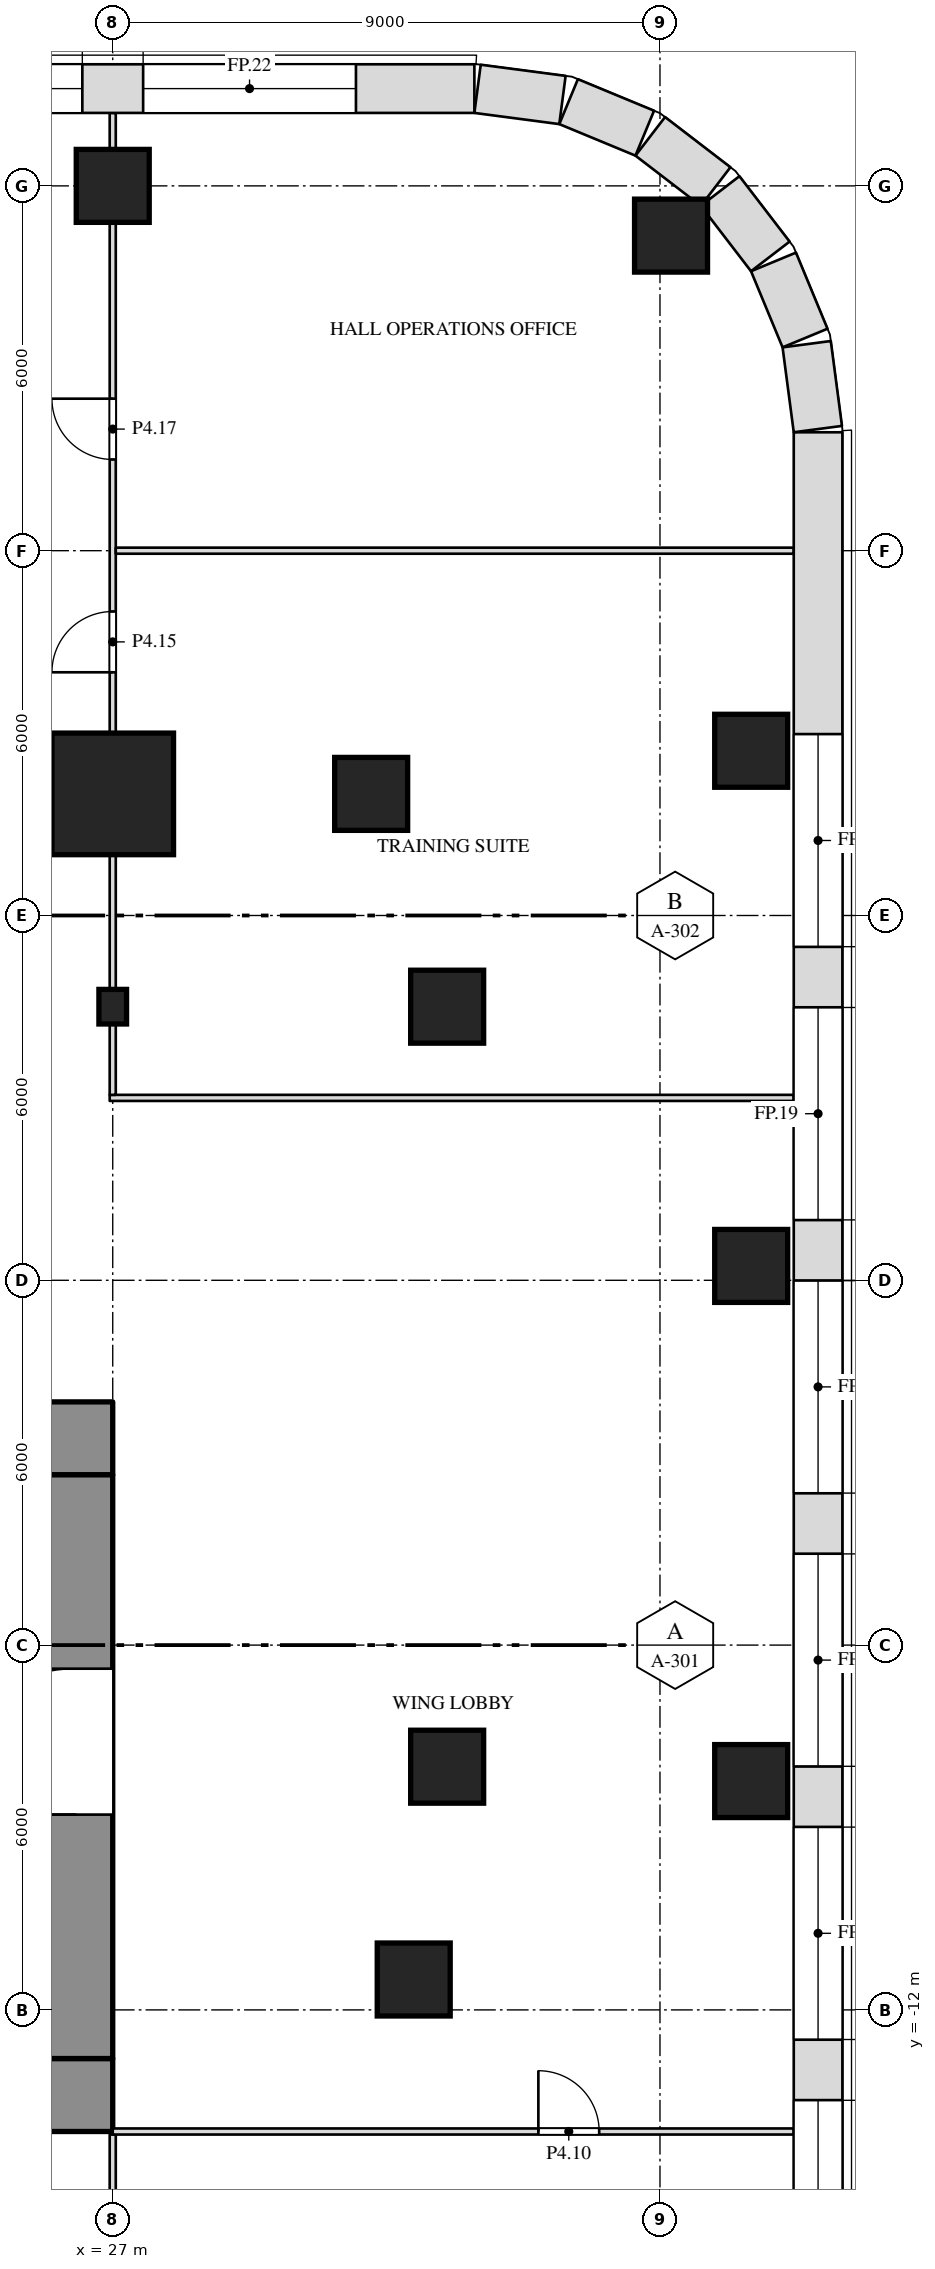
"""IFC4 building model, lengths in metres.
Left out: names, types, materials, properties, quantities, classifications, styles, units other than length and angle.
Written with IfcOpenShell. Run it as: python <this file> out.ifc"""

import sys

from ifc_helpers import new_model, si_unit, direction, frame, frame_2d, origin, origin_2d, place, context, subcontext, project, spatial, rectangle, i_section, extrude, element, fill, save


model = new_model("IFC4")
c1 = context("Model", 3, precision=1e-05, world=origin(), true_north=direction((0.0, 1.0)))
c2 = subcontext(c1, "Body", "Model", "MODEL_VIEW")
j1 = project(units=[si_unit("LENGTHUNIT", "METRE"), si_unit("PLANEANGLEUNIT", "RADIAN")], contexts=[c1])
p1 = place(None, origin())
s1 = spatial("IfcSite", under=j1, at=p1, CompositionType="ELEMENT")
p2 = place(p1, origin())
s2 = spatial("IfcBuilding", under=s1, at=p2, CompositionType="ELEMENT")
p3 = place(p2, frame((0.0, 0.0, 27.0)))
s3 = spatial("IfcBuildingStorey", under=s2, at=p3, CompositionType="ELEMENT", Elevation=27.0)
for number, where, z_axis, x_axis in (
    (1, (31.95, -11.5, 0.0), (0.0, 0.0, 1.0), (1.0, 0.0, 0.0)),
    (2, (37.5, -8.236, 0.0), (0.0, 0.0, 1.0), (1.0, 0.0, 0.0)),
    (3, (32.5, -8.0, 0.0), (0.0, 0.0, 1.0), (1.0, 0.0, 0.0)),
    (4, (37.5, 0.236, 0.0), (0.0, 0.0, 1.0), (1.0, 0.0, 0.0)),
):
    element("IfcColumn", number, at=place(p3, frame(where, z_axis=z_axis, x_axis=x_axis)), inside=s3, PredefinedType="COLUMN", context=c2, shape_type="SweptSolid", body=[
        extrude(rectangle(XDim=1.2, YDim=1.2, at=origin_2d()), origin(), (0.0, 0.0, 1.0), 6.0),
    ])
p4 = place(p3, frame((27.0, 4.5, 0.0), z_axis=(0.0, 0.0, 1.0), x_axis=(1.0, 0.0, 0.0)))
e5 = element("IfcColumn", 5, at=p4, inside=s3, PredefinedType="COLUMN", context=c2, shape_type="SweptSolid", body=[
    extrude(i_section(OverallWidth=0.455, OverallDepth=0.569, WebThickness=0.078, FlangeThickness=0.125, at=origin_2d()), origin(), (0.0, 0.0, 1.0), 6.0),
])
p5 = place(p3, frame((32.5, 4.5, 0.0), z_axis=(0.0, 0.0, 1.0), x_axis=(1.0, 0.0, 0.0)))
e6 = element("IfcColumn", 6, at=p5, inside=s3, PredefinedType="COLUMN", context=c2, shape_type="SweptSolid", body=[
    extrude(rectangle(XDim=1.2, YDim=1.2, at=origin_2d()), origin(), (0.0, 0.0, 1.0), 6.0),
])
p6 = place(p3, frame((27.0, 8.0, 0.0), z_axis=(0.0, 0.0, 1.0), x_axis=(1.0, 0.0, 0.0)))
e7 = element("IfcColumn", 7, at=p6, inside=s3, PredefinedType="COLUMN", context=c2, shape_type="SweptSolid", body=[
    extrude(rectangle(XDim=2.0, YDim=2.0, at=origin_2d()), origin(), (0.0, 0.0, 1.0), 6.0),
])
for number, where, z_axis, x_axis in (
    (8, (31.25, 8.0, 0.0), (0.0, 0.0, 1.0), (1.0, 0.0, 0.0)),
    (9, (37.5, 8.709, 0.0), (0.0, 0.0, 1.0), (1.0, 0.0, 0.0)),
    (10, (36.182, 17.182, 0.0), (0.0, 0.0, 1.0), (1.0, 0.0, 0.0)),
    (11, (27.0, 18.0, 0.0), (0.0, 0.0, 1.0), (1.0, 0.0, 0.0)),
):
    element("IfcColumn", number, at=place(p3, frame(where, z_axis=z_axis, x_axis=x_axis)), inside=s3, PredefinedType="COLUMN", context=c2, shape_type="SweptSolid", body=[
        extrude(rectangle(XDim=1.2, YDim=1.2, at=origin_2d()), origin(), (0.0, 0.0, 1.0), 6.0),
    ])
p7 = place(p3, frame((-27.0, -2.6, 0.0), z_axis=(0.0, 0.0, 1.0), x_axis=(1.0, 0.0, 0.0)))
e12 = element("IfcWall", 12, at=p7, inside=s3, PredefinedType="SHEAR", context=c2, shape_type="SweptSolid", body=[
    extrude(rectangle(XDim=54.0, YDim=1.2, at=frame_2d((27.0, 0.0))), origin(), (0.0, 0.0, 1.0), 5.7),
])
p8 = place(p3, frame((-27.0, -13.4, 0.0), z_axis=(0.0, 0.0, 1.0), x_axis=(1.0, 0.0, 0.0)))
e13 = element("IfcWall", 13, at=p8, inside=s3, PredefinedType="SHEAR", context=c2, shape_type="SweptSolid", body=[
    extrude(rectangle(XDim=54.0, YDim=1.2, at=frame_2d((27.0, 0.0))), origin(), (0.0, 0.0, 1.0), 5.7),
])
p9 = place(p8, frame((16.45, 0.0, 0.0)))
e14 = element("IfcOpeningElement", 14, at=p9, cuts=e13, PredefinedType="OPENING", context=c2, shape_type="SweptSolid", body=[
    extrude(rectangle(XDim=1.0, YDim=2.1, at=frame_2d((0.5, 1.05))), frame((0.0, 0.612, 0.0), z_axis=(0.0, -1.0, 0.0), x_axis=(1.0, 0.0, 0.0)), (0.0, 0.0, 1.0), 1.224),
])
p10 = place(p8, frame((36.55, 0.0, 0.0)))
e15 = element("IfcOpeningElement", 15, at=p10, cuts=e13, PredefinedType="OPENING", context=c2, shape_type="SweptSolid", body=[
    extrude(rectangle(XDim=1.0, YDim=2.1, at=frame_2d((0.5, 1.05))), frame((0.0, 0.612, 0.0), z_axis=(0.0, -1.0, 0.0), x_axis=(1.0, 0.0, 0.0)), (0.0, 0.0, 1.0), 1.224),
])
p11 = place(p3, frame((26.4, -12.8, 0.0), z_axis=(0.0, 0.0, 1.0), x_axis=(0.0, 1.0, 0.0)))
e16 = element("IfcWall", 16, at=p11, inside=s3, PredefinedType="SHEAR", context=c2, shape_type="SweptSolid", body=[
    extrude(rectangle(XDim=9.6, YDim=1.2, at=frame_2d((4.8, 0.0))), origin(), (0.0, 0.0, 1.0), 5.7),
])
p12 = place(p11, frame((4.012, 0.0, 0.0)))
e17 = element("IfcOpeningElement", 17, at=p12, cuts=e16, PredefinedType="OPENING", context=c2, shape_type="SweptSolid", body=[
    extrude(rectangle(XDim=2.4, YDim=2.1, at=frame_2d((1.2, 1.05))), frame((0.0, 0.612, 0.0), z_axis=(0.0, -1.0, 0.0), x_axis=(1.0, 0.0, 0.0)), (0.0, 0.0, 1.0), 1.224),
])
p13 = place(p3, frame((27.0, -16.9, 0.0), z_axis=(0.0, 0.0, 1.0), x_axis=(0.0, 1.0, 0.0)))
e18 = element("IfcWall", 18, at=p13, inside=s3, PredefinedType="PARTITIONING", context=c2, shape_type="SweptSolid", body=[
    extrude(rectangle(XDim=2.85, YDim=0.1, at=frame_2d((1.425, 0.0))), origin(), (0.0, 0.0, 1.0), 5.088),
])
p14 = place(p3, frame((27.0, -14.0, 0.0), z_axis=(0.0, 0.0, 1.0), x_axis=(1.0, 0.0, 0.0)))
e19 = element("IfcWall", 19, at=p14, inside=s3, PredefinedType="PARTITIONING", context=c2, shape_type="SweptSolid", body=[
    extrude(rectangle(XDim=11.2, YDim=0.1, at=frame_2d((5.6, 0.0))), origin(), (0.0, 0.0, 1.0), 5.7),
])
p15 = place(p14, frame((7.0, 0.0, 0.0)))
e20 = element("IfcOpeningElement", 20, at=p15, cuts=e19, PredefinedType="OPENING", context=c2, shape_type="SweptSolid", body=[
    extrude(rectangle(XDim=1.0, YDim=2.1, at=frame_2d((0.5, 1.05))), frame((0.0, 0.062, 0.0), z_axis=(0.0, -1.0, 0.0), x_axis=(1.0, 0.0, 0.0)), (0.0, 0.0, 1.0), 0.124),
])
p16 = place(p3, frame((26.95, 3.0, 0.0), z_axis=(0.0, 0.0, 1.0), x_axis=(1.0, 0.0, 0.0)))
e21 = element("IfcWall", 21, at=p16, inside=s3, PredefinedType="PARTITIONING", context=c2, shape_type="SweptSolid", body=[
    extrude(rectangle(XDim=11.25, YDim=0.1, at=frame_2d((5.625, 0.0))), origin(), (0.0, 0.0, 1.0), 5.7),
])
p17 = place(p3, frame((27.0, 3.05, 0.0), z_axis=(0.0, 0.0, 1.0), x_axis=(0.0, 1.0, 0.0)))
e22 = element("IfcWall", 22, at=p17, inside=s3, PredefinedType="PARTITIONING", context=c2, shape_type="SweptSolid", body=[
    extrude(rectangle(XDim=1.166, YDim=0.1, at=frame_2d((0.583, 0.0))), origin(), (0.0, 0.0, 1.0), 5.088),
])
p18 = place(p3, frame((27.0, 4.784, 0.0), z_axis=(0.0, 0.0, 1.0), x_axis=(0.0, 1.0, 0.0)))
e23 = element("IfcWall", 23, at=p18, inside=s3, PredefinedType="PARTITIONING", context=c2, shape_type="SweptSolid", body=[
    extrude(rectangle(XDim=2.216, YDim=0.1, at=frame_2d((1.108, 0.0))), origin(), (0.0, 0.0, 1.0), 5.088),
])
p19 = place(p3, frame((27.0, 9.0, 0.0), z_axis=(0.0, 0.0, 1.0), x_axis=(0.0, 1.0, 0.0)))
e24 = element("IfcWall", 24, at=p19, inside=s3, PredefinedType="PARTITIONING", context=c2, shape_type="SweptSolid", body=[
    extrude(rectangle(XDim=8.4, YDim=0.1, at=frame_2d((4.2, 0.0))), origin(), (0.0, 0.0, 1.0), 5.088),
])
p20 = place(p19, frame((1.0, 0.0, 0.0)))
e25 = element("IfcOpeningElement", 25, at=p20, cuts=e24, PredefinedType="OPENING", context=c2, shape_type="SweptSolid", body=[
    extrude(rectangle(XDim=1.0, YDim=2.1, at=frame_2d((0.5, 1.05))), frame((0.0, 0.062, 0.0), z_axis=(0.0, -1.0, 0.0), x_axis=(1.0, 0.0, 0.0)), (0.0, 0.0, 1.0), 0.124),
])
p21 = place(p19, frame((4.5, 0.0, 0.0)))
e26 = element("IfcOpeningElement", 26, at=p21, cuts=e24, PredefinedType="OPENING", context=c2, shape_type="SweptSolid", body=[
    extrude(rectangle(XDim=1.0, YDim=2.1, at=frame_2d((0.5, 1.05))), frame((0.0, 0.062, 0.0), z_axis=(0.0, -1.0, 0.0), x_axis=(1.0, 0.0, 0.0)), (0.0, 0.0, 1.0), 0.124),
])
p22 = place(p3, frame((27.0, 18.6, 0.0), z_axis=(0.0, 0.0, 1.0), x_axis=(0.0, 1.0, 0.0)))
e27 = element("IfcWall", 27, at=p22, inside=s3, PredefinedType="PARTITIONING", context=c2, shape_type="SweptSolid", body=[
    extrude(rectangle(XDim=0.6, YDim=0.1, at=frame_2d((0.3, 0.0))), origin(), (0.0, 0.0, 1.0), 5.7),
])
p23 = place(p3, frame((27.05, 12.0, 0.0), z_axis=(0.0, 0.0, 1.0), x_axis=(1.0, 0.0, 0.0)))
e28 = element("IfcWall", 28, at=p23, inside=s3, PredefinedType="PARTITIONING", context=c2, shape_type="SweptSolid", body=[
    extrude(rectangle(XDim=11.15, YDim=0.1, at=frame_2d((5.575, 0.0))), origin(), (0.0, 0.0, 1.0), 5.7),
])
p24 = place(p3, frame((38.6, -21.948, 0.0), z_axis=(0.0, 0.0, 1.0), x_axis=(0.0, 1.0, 0.0)))
e29 = element("IfcWall", 29, at=p24, inside=s3, PredefinedType="SOLIDWALL", context=c2, shape_type="SweptSolid", body=[
    extrude(rectangle(XDim=35.895, YDim=0.8, at=frame_2d((17.948, 0.0))), origin(), (0.0, 0.0, 1.0), 5.7),
])
p25 = place(p24, frame((4.964, 0.0, 1.0)))
e30 = element("IfcOpeningElement", 30, at=p25, cuts=e29, PredefinedType="OPENING", context=c2, shape_type="SweptSolid", body=[
    extrude(rectangle(XDim=3.5, YDim=4.0, at=frame_2d((1.75, 2.0))), frame((0.0, 0.412, 0.0), z_axis=(0.0, -1.0, 0.0), x_axis=(1.0, 0.0, 0.0)), (0.0, 0.0, 1.0), 0.824),
])
p26 = place(p24, frame((9.458, 0.0, 1.0)))
e31 = element("IfcOpeningElement", 31, at=p26, cuts=e29, PredefinedType="OPENING", context=c2, shape_type="SweptSolid", body=[
    extrude(rectangle(XDim=3.5, YDim=4.0, at=frame_2d((1.75, 2.0))), frame((0.0, 0.412, 0.0), z_axis=(0.0, -1.0, 0.0), x_axis=(1.0, 0.0, 0.0)), (0.0, 0.0, 1.0), 0.824),
])
p27 = place(p24, frame((13.951, 0.0, 1.0)))
e32 = element("IfcOpeningElement", 32, at=p27, cuts=e29, PredefinedType="OPENING", context=c2, shape_type="SweptSolid", body=[
    extrude(rectangle(XDim=3.5, YDim=4.0, at=frame_2d((1.75, 2.0))), frame((0.0, 0.412, 0.0), z_axis=(0.0, -1.0, 0.0), x_axis=(1.0, 0.0, 0.0)), (0.0, 0.0, 1.0), 0.824),
])
p28 = place(p24, frame((18.444, 0.0, 1.0)))
e33 = element("IfcOpeningElement", 33, at=p28, cuts=e29, PredefinedType="OPENING", context=c2, shape_type="SweptSolid", body=[
    extrude(rectangle(XDim=3.5, YDim=4.0, at=frame_2d((1.75, 2.0))), frame((0.0, 0.412, 0.0), z_axis=(0.0, -1.0, 0.0), x_axis=(1.0, 0.0, 0.0)), (0.0, 0.0, 1.0), 0.824),
])
p29 = place(p24, frame((22.938, 0.0, 1.0)))
e34 = element("IfcOpeningElement", 34, at=p29, cuts=e29, PredefinedType="OPENING", context=c2, shape_type="SweptSolid", body=[
    extrude(rectangle(XDim=3.5, YDim=4.0, at=frame_2d((1.75, 2.0))), frame((0.0, 0.412, 0.0), z_axis=(0.0, -1.0, 0.0), x_axis=(1.0, 0.0, 0.0)), (0.0, 0.0, 1.0), 0.824),
])
p30 = place(p24, frame((27.431, 0.0, 1.0)))
e35 = element("IfcOpeningElement", 35, at=p30, cuts=e29, PredefinedType="OPENING", context=c2, shape_type="SweptSolid", body=[
    extrude(rectangle(XDim=3.5, YDim=4.0, at=frame_2d((1.75, 2.0))), frame((0.0, 0.412, 0.0), z_axis=(0.0, -1.0, 0.0), x_axis=(1.0, 0.0, 0.0)), (0.0, 0.0, 1.0), 0.824),
])
p31 = place(p3, frame((38.597, 14.0, 0.0), z_axis=(0.0, 0.0, 1.0), x_axis=(-0.130517283865, 0.99144603414, 0.0)))
e36 = element("IfcWall", 36, at=p31, inside=s3, PredefinedType="SOLIDWALL", context=c2, shape_type="SweptSolid", body=[
    extrude(rectangle(XDim=1.408, YDim=0.8, at=frame_2d((0.704, 0.0))), origin(), (0.0, 0.0, 1.0), 5.7),
])
p32 = place(p3, frame((38.386, 15.497, 0.0), z_axis=(0.0, 0.0, 1.0), x_axis=(-0.38276009378, 0.923847774587, 0.0)))
e37 = element("IfcWall", 37, at=p32, inside=s3, PredefinedType="SOLIDWALL", context=c2, shape_type="SweptSolid", body=[
    extrude(rectangle(XDim=1.355, YDim=0.8, at=frame_2d((0.678, 0.0))), origin(), (0.0, 0.0, 1.0), 5.7),
])
for number, where, z_axis, x_axis in (
    (38, (37.815, 16.84, 0.0), (0.0, 0.0, 1.0), (-0.609, 0.793, 0.0)),
    (39, (36.916, 17.989, 0.0), (0.0, 0.0, 1.0), (-0.793, 0.609, 0.0)),
):
    element("IfcWall", number, at=place(p3, frame(where, z_axis=z_axis, x_axis=x_axis)), inside=s3, PredefinedType="SOLIDWALL", context=c2, shape_type="SweptSolid", body=[
        extrude(rectangle(XDim=1.356, YDim=0.8, at=frame_2d((0.678, 0.0))), origin(), (0.0, 0.0, 1.0), 5.7),
    ])
p33 = place(p3, frame((35.75, 18.867, 0.0), z_axis=(0.0, 0.0, 1.0), x_axis=(-0.923847774587, 0.38276009378, 0.0)))
e40 = element("IfcWall", 40, at=p33, inside=s3, PredefinedType="SOLIDWALL", context=c2, shape_type="SweptSolid", body=[
    extrude(rectangle(XDim=1.355, YDim=0.8, at=frame_2d((0.678, 0.0))), origin(), (0.0, 0.0, 1.0), 5.7),
])
p34 = place(p3, frame((34.396, 19.413, 0.0), z_axis=(0.0, 0.0, 1.0), x_axis=(-0.99144603414, 0.130517283865, 0.0)))
e41 = element("IfcWall", 41, at=p34, inside=s3, PredefinedType="SOLIDWALL", context=c2, shape_type="SweptSolid", body=[
    extrude(rectangle(XDim=1.408, YDim=0.8, at=frame_2d((0.704, 0.0))), origin(), (0.0, 0.0, 1.0), 5.7),
])
p35 = place(p3, frame((32.948, 19.6, 0.0), z_axis=(0.0, 0.0, 1.0), x_axis=(-1.0, 0.0, 0.0)))
e42 = element("IfcWall", 42, at=p35, inside=s3, PredefinedType="SOLIDWALL", context=c2, shape_type="SweptSolid", body=[
    extrude(rectangle(XDim=14.948, YDim=0.8, at=frame_2d((7.474, 0.0))), origin(), (0.0, 0.0, 1.0), 5.7),
])
p36 = place(p35, frame((1.948, 0.0, 1.0)))
e43 = element("IfcOpeningElement", 43, at=p36, cuts=e42, PredefinedType="OPENING", context=c2, shape_type="SweptSolid", body=[
    extrude(rectangle(XDim=3.5, YDim=4.0, at=frame_2d((1.75, 2.0))), frame((0.0, 0.412, 0.0), z_axis=(0.0, -1.0, 0.0), x_axis=(1.0, 0.0, 0.0)), (0.0, 0.0, 1.0), 0.824),
])
p37 = place(p35, frame((6.448, 0.0, 1.0)))
e44 = element("IfcOpeningElement", 44, at=p37, cuts=e42, PredefinedType="OPENING", context=c2, shape_type="SweptSolid", body=[
    extrude(rectangle(XDim=3.5, YDim=4.0, at=frame_2d((1.75, 2.0))), frame((0.0, 0.412, 0.0), z_axis=(0.0, -1.0, 0.0), x_axis=(1.0, 0.0, 0.0)), (0.0, 0.0, 1.0), 0.824),
])
p38 = place(p35, frame((10.948, 0.0, 1.0)))
e45 = element("IfcOpeningElement", 45, at=p38, cuts=e42, PredefinedType="OPENING", context=c2, shape_type="SweptSolid", body=[
    extrude(rectangle(XDim=3.5, YDim=4.0, at=frame_2d((1.75, 2.0))), frame((0.0, 0.412, 0.0), z_axis=(0.0, -1.0, 0.0), x_axis=(1.0, 0.0, 0.0)), (0.0, 0.0, 1.0), 0.824),
])
p39 = place(p15, origin())
e46 = element("IfcDoor", 46, at=p39, inside=s3, OperationType="SINGLE_SWING_LEFT", PredefinedType="DOOR", context=c2, shape_type="SweptSolid", body=[
    extrude(rectangle(XDim=1.0, YDim=2.1, at=frame_2d((0.5, 1.05))), frame((0.0, 0.025, 0.0), z_axis=(0.0, -1.0, 0.0), x_axis=(1.0, 0.0, 0.0)), (0.0, 0.0, 1.0), 0.05),
])
fill(e20, e46)
p40 = place(p20, origin())
e47 = element("IfcDoor", 47, at=p40, inside=s3, OperationType="SINGLE_SWING_LEFT", PredefinedType="DOOR", context=c2, shape_type="SweptSolid", body=[
    extrude(rectangle(XDim=1.0, YDim=2.1, at=frame_2d((0.5, 1.05))), frame((0.0, 0.025, 0.0), z_axis=(0.0, -1.0, 0.0), x_axis=(1.0, 0.0, 0.0)), (0.0, 0.0, 1.0), 0.05),
])
fill(e25, e47)
p41 = place(p21, origin())
e48 = element("IfcDoor", 48, at=p41, inside=s3, OperationType="SINGLE_SWING_RIGHT", PredefinedType="DOOR", context=c2, shape_type="SweptSolid", body=[
    extrude(rectangle(XDim=1.0, YDim=2.1, at=frame_2d((0.5, 1.05))), frame((0.0, 0.025, 0.0), z_axis=(0.0, -1.0, 0.0), x_axis=(1.0, 0.0, 0.0)), (0.0, 0.0, 1.0), 0.05),
])
fill(e26, e48)
p42 = place(p25, origin())
e49 = element("IfcWindow", 49, at=p42, inside=s3, PartitioningType="SINGLE_PANEL", PredefinedType="WINDOW", context=c2, shape_type="SweptSolid", body=[
    extrude(rectangle(XDim=3.5, YDim=4.0, at=frame_2d((1.75, 2.0))), frame((0.0, 0.03, 0.0), z_axis=(0.0, -1.0, 0.0), x_axis=(1.0, 0.0, 0.0)), (0.0, 0.0, 1.0), 0.06),
])
fill(e30, e49)
p43 = place(p26, origin())
e50 = element("IfcWindow", 50, at=p43, inside=s3, PartitioningType="SINGLE_PANEL", PredefinedType="WINDOW", context=c2, shape_type="SweptSolid", body=[
    extrude(rectangle(XDim=3.5, YDim=4.0, at=frame_2d((1.75, 2.0))), frame((0.0, 0.03, 0.0), z_axis=(0.0, -1.0, 0.0), x_axis=(1.0, 0.0, 0.0)), (0.0, 0.0, 1.0), 0.06),
])
fill(e31, e50)
p44 = place(p27, origin())
e51 = element("IfcWindow", 51, at=p44, inside=s3, PartitioningType="SINGLE_PANEL", PredefinedType="WINDOW", context=c2, shape_type="SweptSolid", body=[
    extrude(rectangle(XDim=3.5, YDim=4.0, at=frame_2d((1.75, 2.0))), frame((0.0, 0.03, 0.0), z_axis=(0.0, -1.0, 0.0), x_axis=(1.0, 0.0, 0.0)), (0.0, 0.0, 1.0), 0.06),
])
fill(e32, e51)
p45 = place(p28, origin())
e52 = element("IfcWindow", 52, at=p45, inside=s3, PartitioningType="SINGLE_PANEL", PredefinedType="WINDOW", context=c2, shape_type="SweptSolid", body=[
    extrude(rectangle(XDim=3.5, YDim=4.0, at=frame_2d((1.75, 2.0))), frame((0.0, 0.03, 0.0), z_axis=(0.0, -1.0, 0.0), x_axis=(1.0, 0.0, 0.0)), (0.0, 0.0, 1.0), 0.06),
])
fill(e33, e52)
p46 = place(p29, origin())
e53 = element("IfcWindow", 53, at=p46, inside=s3, PartitioningType="SINGLE_PANEL", PredefinedType="WINDOW", context=c2, shape_type="SweptSolid", body=[
    extrude(rectangle(XDim=3.5, YDim=4.0, at=frame_2d((1.75, 2.0))), frame((0.0, 0.03, 0.0), z_axis=(0.0, -1.0, 0.0), x_axis=(1.0, 0.0, 0.0)), (0.0, 0.0, 1.0), 0.06),
])
fill(e34, e53)
p47 = place(p30, origin())
e54 = element("IfcWindow", 54, at=p47, inside=s3, PartitioningType="SINGLE_PANEL", PredefinedType="WINDOW", context=c2, shape_type="SweptSolid", body=[
    extrude(rectangle(XDim=3.5, YDim=4.0, at=frame_2d((1.75, 2.0))), frame((0.0, 0.03, 0.0), z_axis=(0.0, -1.0, 0.0), x_axis=(1.0, 0.0, 0.0)), (0.0, 0.0, 1.0), 0.06),
])
fill(e35, e54)
p48 = place(p36, origin())
e55 = element("IfcWindow", 55, at=p48, inside=s3, PartitioningType="SINGLE_PANEL", PredefinedType="WINDOW", context=c2, shape_type="SweptSolid", body=[
    extrude(rectangle(XDim=3.5, YDim=4.0, at=frame_2d((1.75, 2.0))), frame((0.0, 0.03, 0.0), z_axis=(0.0, -1.0, 0.0), x_axis=(1.0, 0.0, 0.0)), (0.0, 0.0, 1.0), 0.06),
])
fill(e43, e55)
p49 = place(p37, origin())
e56 = element("IfcWindow", 56, at=p49, inside=s3, PartitioningType="SINGLE_PANEL", PredefinedType="WINDOW", context=c2, shape_type="SweptSolid", body=[
    extrude(rectangle(XDim=3.5, YDim=4.0, at=frame_2d((1.75, 2.0))), frame((0.0, 0.03, 0.0), z_axis=(0.0, -1.0, 0.0), x_axis=(1.0, 0.0, 0.0)), (0.0, 0.0, 1.0), 0.06),
])
fill(e44, e56)
p50 = place(p12, origin())
e57 = element("IfcDoor", 57, at=p50, inside=s3, OperationType="DOUBLE_DOOR_SINGLE_SWING", PredefinedType="DOOR", context=c2, shape_type="SweptSolid", body=[
    extrude(rectangle(XDim=2.4, YDim=2.1, at=frame_2d((1.2, 1.05))), frame((0.0, 0.025, 0.0), z_axis=(0.0, -1.0, 0.0), x_axis=(1.0, 0.0, 0.0)), (0.0, 0.0, 1.0), 0.05),
])
fill(e17, e57)
save(model, sys.argv[1])
